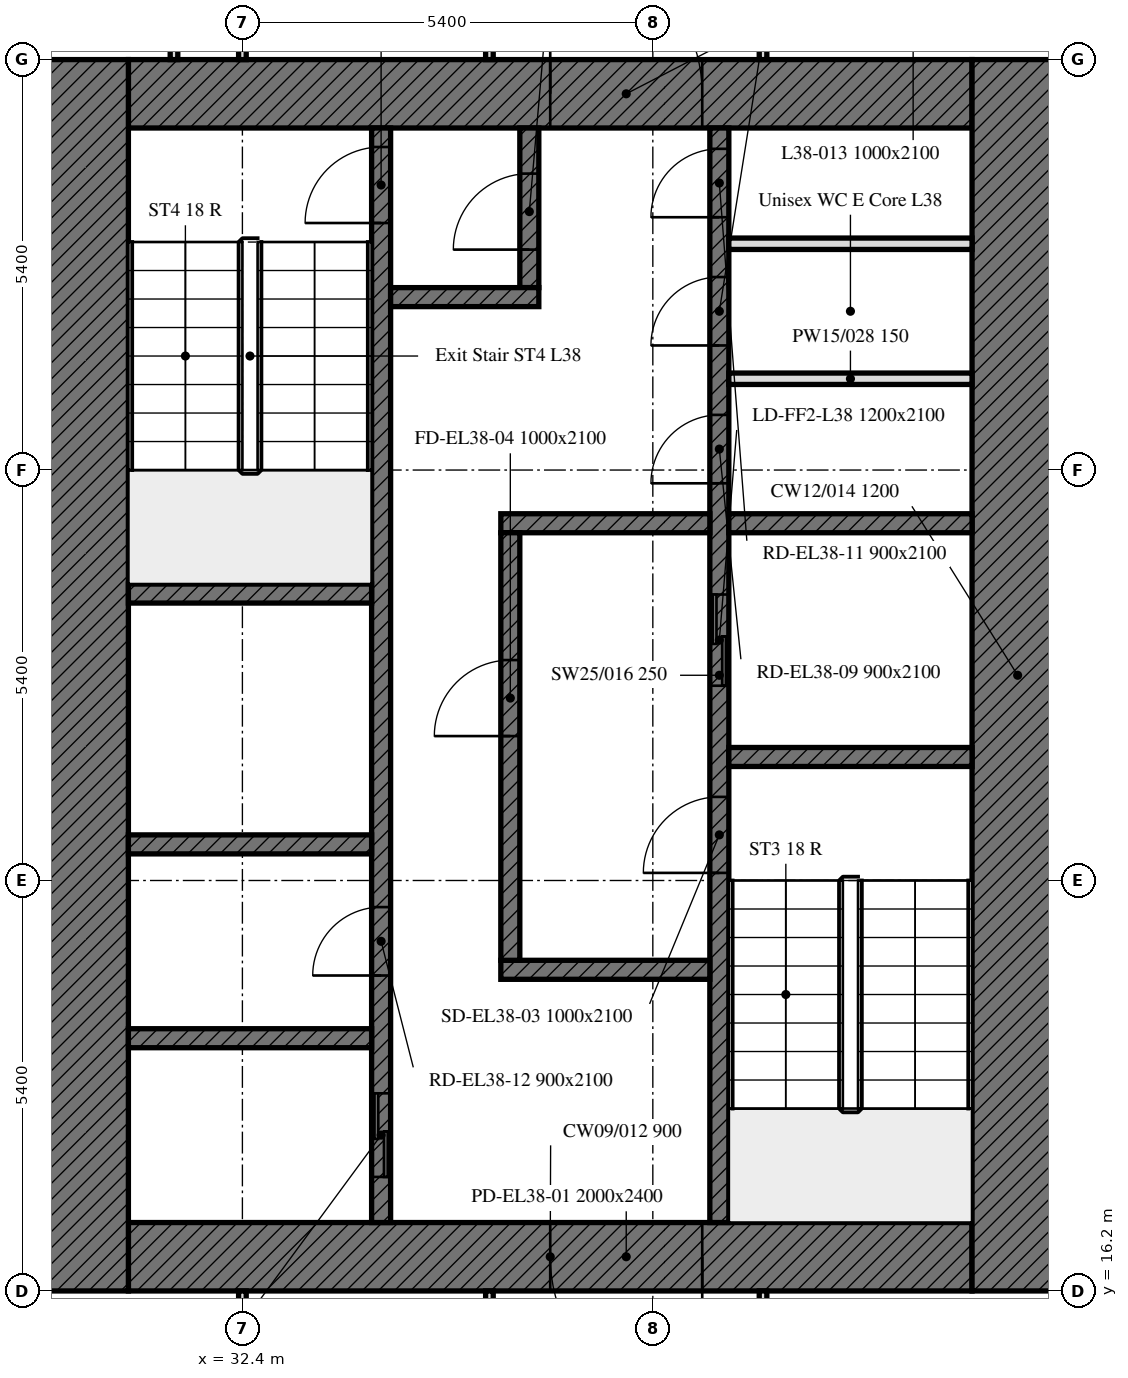
"""IFC4 building model, lengths in metres.
Left out: names, types, materials, properties, quantities, classifications, styles, units other than length and angle.
Written with IfcOpenShell. Run it as: python <this file> out.ifc"""

import sys

from ifc_helpers import new_model, si_unit, direction, frame, frame_2d, origin, place, context, subcontext, project, spatial, rectangle, extrude, element, fill, save


model = new_model("IFC4")
c1 = context("Model", 3, precision=1e-05, world=origin(), true_north=direction((0.0, 1.0)))
c2 = subcontext(c1, "Body", "Model", "MODEL_VIEW")
j1 = project(units=[si_unit("LENGTHUNIT", "METRE"), si_unit("PLANEANGLEUNIT", "RADIAN")], contexts=[c1])
p1 = place(None, origin())
s1 = spatial("IfcSite", under=j1, at=p1, CompositionType="ELEMENT")
p2 = place(p1, origin())
s2 = spatial("IfcBuilding", under=s1, at=p2, CompositionType="ELEMENT")
p3 = place(p2, frame((0.0, 0.0, 162.7)))
s3 = spatial("IfcBuildingStorey", under=s2, at=p3, CompositionType="ELEMENT", Elevation=162.7)
p4 = place(p3, frame((42.0, 16.65, 0.0), z_axis=(0.0, 0.0, 1.0), x_axis=(-1.0, 0.0, 0.0)))
e1 = element("IfcWall", 1, at=p4, inside=s3, PredefinedType="SOLIDWALL", context=c2, shape_type="SweptSolid", body=[
    extrude(rectangle(XDim=11.1, YDim=0.9, at=frame_2d((5.55, 0.0))), origin(), (0.0, 0.0, 1.0), 3.0),
])
p5 = place(p4, frame((3.55, 0.0, 0.0)))
e2 = element("IfcOpeningElement", 2, at=p5, cuts=e1, PredefinedType="OPENING", context=c2, shape_type="SweptSolid", body=[
    extrude(rectangle(XDim=2.0, YDim=2.4, at=frame_2d((1.0, 1.2))), frame((0.0, 0.45, 0.0), z_axis=(0.0, -1.0, 0.0), x_axis=(1.0, 0.0, 0.0)), (0.0, 0.0, 1.0), 0.9),
])
p6 = place(p3, frame((30.9, 31.95, 0.0), z_axis=(0.0, 0.0, 1.0), x_axis=(1.0, 0.0, 0.0)))
e3 = element("IfcWall", 3, at=p6, inside=s3, PredefinedType="SOLIDWALL", context=c2, shape_type="SweptSolid", body=[
    extrude(rectangle(XDim=11.1, YDim=0.9, at=frame_2d((5.55, 0.0))), origin(), (0.0, 0.0, 1.0), 3.0),
])
p7 = place(p6, frame((5.55, 0.0, 0.0)))
e4 = element("IfcOpeningElement", 4, at=p7, cuts=e3, PredefinedType="OPENING", context=c2, shape_type="SweptSolid", body=[
    extrude(rectangle(XDim=2.0, YDim=2.4, at=frame_2d((1.0, 1.2))), frame((0.0, 0.45, 0.0), z_axis=(0.0, -1.0, 0.0), x_axis=(1.0, 0.0, 0.0)), (0.0, 0.0, 1.0), 0.9),
])
for number, where, z_axis, x_axis in (
    (5, (42.6, 32.4, 0.0), (0.0, 0.0, 1.0), (0.0, -1.0, 0.0)),
    (6, (30.3, 16.2, 0.0), (0.0, 0.0, 1.0), (0.0, 1.0, 0.0)),
):
    element("IfcWall", number, at=place(p3, frame(where, z_axis=z_axis, x_axis=x_axis)), inside=s3, PredefinedType="SOLIDWALL", context=c2, shape_type="SweptSolid", body=[
        extrude(rectangle(XDim=16.2, YDim=1.2, at=frame_2d((8.1, 0.0))), origin(), (0.0, 0.0, 1.0), 3.0),
    ])
p8 = place(p3, frame((38.675, 17.1, 0.0), z_axis=(0.0, 0.0, 1.0), x_axis=(0.0, 1.0, 0.0)))
e7 = element("IfcWall", 7, at=p8, inside=s3, PredefinedType="SOLIDWALL", context=c2, shape_type="SweptSolid", body=[
    extrude(rectangle(XDim=14.4, YDim=0.25, at=frame_2d((7.2, 0.0))), origin(), (0.0, 0.0, 1.0), 3.0),
])
p9 = place(p8, frame((4.6, 0.0, 0.0)))
e8 = element("IfcOpeningElement", 8, at=p9, cuts=e7, PredefinedType="OPENING", context=c2, shape_type="SweptSolid", body=[
    extrude(rectangle(XDim=1.0, YDim=2.1, at=frame_2d((0.5, 1.05))), frame((0.0, 0.125, 0.0), z_axis=(0.0, -1.0, 0.0), x_axis=(1.0, 0.0, 0.0)), (0.0, 0.0, 1.0), 0.25),
])
p10 = place(p8, frame((7.062, 0.0, 0.0)))
e9 = element("IfcOpeningElement", 9, at=p10, cuts=e7, PredefinedType="OPENING", context=c2, shape_type="SweptSolid", body=[
    extrude(rectangle(XDim=1.2, YDim=2.1, at=frame_2d((0.6, 1.05))), frame((0.0, 0.125, 0.0), z_axis=(0.0, -1.0, 0.0), x_axis=(1.0, 0.0, 0.0)), (0.0, 0.0, 1.0), 0.25),
])
p11 = place(p8, frame((9.726, 0.0, 0.0)))
e10 = element("IfcOpeningElement", 10, at=p11, cuts=e7, PredefinedType="OPENING", context=c2, shape_type="SweptSolid", body=[
    extrude(rectangle(XDim=0.9, YDim=2.1, at=frame_2d((0.45, 1.05))), frame((0.0, 0.125, 0.0), z_axis=(0.0, -1.0, 0.0), x_axis=(1.0, 0.0, 0.0)), (0.0, 0.0, 1.0), 0.25),
])
p12 = place(p8, frame((11.539, 0.0, 0.0)))
e11 = element("IfcOpeningElement", 11, at=p12, cuts=e7, PredefinedType="OPENING", context=c2, shape_type="SweptSolid", body=[
    extrude(rectangle(XDim=0.9, YDim=2.1, at=frame_2d((0.45, 1.05))), frame((0.0, 0.125, 0.0), z_axis=(0.0, -1.0, 0.0), x_axis=(1.0, 0.0, 0.0)), (0.0, 0.0, 1.0), 0.25),
])
p13 = place(p8, frame((13.226, 0.0, 0.0)))
e12 = element("IfcOpeningElement", 12, at=p13, cuts=e7, PredefinedType="OPENING", context=c2, shape_type="SweptSolid", body=[
    extrude(rectangle(XDim=0.9, YDim=2.1, at=frame_2d((0.45, 1.05))), frame((0.0, 0.125, 0.0), z_axis=(0.0, -1.0, 0.0), x_axis=(1.0, 0.0, 0.0)), (0.0, 0.0, 1.0), 0.25),
])
p14 = place(p3, frame((34.225, 17.1, 0.0), z_axis=(0.0, 0.0, 1.0), x_axis=(0.0, 1.0, 0.0)))
e13 = element("IfcWall", 13, at=p14, inside=s3, PredefinedType="SOLIDWALL", context=c2, shape_type="SweptSolid", body=[
    extrude(rectangle(XDim=14.4, YDim=0.25, at=frame_2d((7.2, 0.0))), origin(), (0.0, 0.0, 1.0), 3.0),
])
p15 = place(p14, frame((13.15, 0.0, 0.0)))
e14 = element("IfcOpeningElement", 14, at=p15, cuts=e13, PredefinedType="OPENING", context=c2, shape_type="SweptSolid", body=[
    extrude(rectangle(XDim=1.0, YDim=2.1, at=frame_2d((0.5, 1.05))), frame((0.0, 0.125, 0.0), z_axis=(0.0, -1.0, 0.0), x_axis=(1.0, 0.0, 0.0)), (0.0, 0.0, 1.0), 0.25),
])
p16 = place(p14, frame((0.6, 0.0, 0.0)))
e15 = element("IfcOpeningElement", 15, at=p16, cuts=e13, PredefinedType="OPENING", context=c2, shape_type="SweptSolid", body=[
    extrude(rectangle(XDim=1.1, YDim=2.1, at=frame_2d((0.55, 1.05))), frame((0.0, 0.125, 0.0), z_axis=(0.0, -1.0, 0.0), x_axis=(1.0, 0.0, 0.0)), (0.0, 0.0, 1.0), 0.25),
])
p17 = place(p14, frame((3.25, 0.0, 0.0)))
e16 = element("IfcOpeningElement", 16, at=p17, cuts=e13, PredefinedType="OPENING", context=c2, shape_type="SweptSolid", body=[
    extrude(rectangle(XDim=0.9, YDim=2.1, at=frame_2d((0.45, 1.05))), frame((0.0, 0.125, 0.0), z_axis=(0.0, -1.0, 0.0), x_axis=(1.0, 0.0, 0.0)), (0.0, 0.0, 1.0), 0.25),
])
p18 = place(p3, frame((38.8, 23.225, 0.0), z_axis=(0.0, 0.0, 1.0), x_axis=(1.0, 0.0, 0.0)))
e17 = element("IfcWall", 17, at=p18, inside=s3, PredefinedType="SOLIDWALL", context=c2, shape_type="SweptSolid", body=[
    extrude(rectangle(XDim=3.2, YDim=0.25, at=frame_2d((1.6, 0.0))), origin(), (0.0, 0.0, 1.0), 3.0),
])
for number, where, z_axis, x_axis in (
    (18, (30.9, 25.375, 0.0), (0.0, 0.0, 1.0), (1.0, 0.0, 0.0)),
    (19, (30.9, 22.075, 0.0), (0.0, 0.0, 1.0), (1.0, 0.0, 0.0)),
):
    element("IfcWall", number, at=place(p3, frame(where, z_axis=z_axis, x_axis=x_axis)), inside=s3, PredefinedType="SOLIDWALL", context=c2, shape_type="SweptSolid", body=[
        extrude(rectangle(XDim=3.2, YDim=0.25, at=frame_2d((1.6, 0.0))), origin(), (0.0, 0.0, 1.0), 3.0),
    ])
p19 = place(p3, frame((38.8, 26.3, 0.0), z_axis=(0.0, 0.0, 1.0), x_axis=(1.0, 0.0, 0.0)))
e20 = element("IfcWall", 20, at=p19, inside=s3, PredefinedType="SOLIDWALL", context=c2, shape_type="SweptSolid", body=[
    extrude(rectangle(XDim=3.2, YDim=0.25, at=frame_2d((1.6, 0.0))), origin(), (0.0, 0.0, 1.0), 3.0),
])
for number, where, z_axis, x_axis in (
    (21, (35.8, 26.3, 0.0), (0.0, 0.0, 1.0), (1.0, 0.0, 0.0)),
    (22, (35.8, 20.425, 0.0), (0.0, 0.0, 1.0), (1.0, 0.0, 0.0)),
):
    element("IfcWall", number, at=place(p3, frame(where, z_axis=z_axis, x_axis=x_axis)), inside=s3, PredefinedType="SOLIDWALL", context=c2, shape_type="SweptSolid", body=[
        extrude(rectangle(XDim=2.75, YDim=0.25, at=frame_2d((1.375, 0.0))), origin(), (0.0, 0.0, 1.0), 3.0),
    ])
p20 = place(p3, frame((36.175, 29.4, 0.0), z_axis=(0.0, 0.0, 1.0), x_axis=(0.0, 1.0, 0.0)))
e23 = element("IfcWall", 23, at=p20, inside=s3, PredefinedType="SOLIDWALL", context=c2, shape_type="SweptSolid", body=[
    extrude(rectangle(XDim=2.1, YDim=0.25, at=frame_2d((1.05, 0.0))), origin(), (0.0, 0.0, 1.0), 3.0),
])
p21 = place(p20, frame((0.5, 0.0, 0.0)))
e24 = element("IfcOpeningElement", 24, at=p21, cuts=e23, PredefinedType="OPENING", context=c2, shape_type="SweptSolid", body=[
    extrude(rectangle(XDim=1.0, YDim=2.1, at=frame_2d((0.5, 1.05))), frame((0.0, 0.125, 0.0), z_axis=(0.0, -1.0, 0.0), x_axis=(1.0, 0.0, 0.0)), (0.0, 0.0, 1.0), 0.25),
])
p22 = place(p3, frame((34.35, 29.275, 0.0), z_axis=(0.0, 0.0, 1.0), x_axis=(1.0, 0.0, 0.0)))
e25 = element("IfcWall", 25, at=p22, inside=s3, PredefinedType="SOLIDWALL", context=c2, shape_type="SweptSolid", body=[
    extrude(rectangle(XDim=1.95, YDim=0.25, at=frame_2d((0.975, 0.0))), origin(), (0.0, 0.0, 1.0), 3.0),
])
p23 = place(p3, frame((35.925, 20.55, 0.0), z_axis=(0.0, 0.0, 1.0), x_axis=(0.0, 1.0, 0.0)))
e26 = element("IfcWall", 26, at=p23, inside=s3, PredefinedType="SOLIDWALL", context=c2, shape_type="SweptSolid", body=[
    extrude(rectangle(XDim=5.625, YDim=0.25, at=frame_2d((2.812, 0.0))), origin(), (0.0, 0.0, 1.0), 3.0),
])
p24 = place(p23, frame((2.95, 0.0, 0.0)))
e27 = element("IfcOpeningElement", 27, at=p24, cuts=e26, PredefinedType="OPENING", context=c2, shape_type="SweptSolid", body=[
    extrude(rectangle(XDim=1.0, YDim=2.1, at=frame_2d((0.5, 1.05))), frame((0.0, 0.125, 0.0), z_axis=(0.0, -1.0, 0.0), x_axis=(1.0, 0.0, 0.0)), (0.0, 0.0, 1.0), 0.25),
])
p25 = place(p3, frame((30.9, 19.525, 0.0), z_axis=(0.0, 0.0, 1.0), x_axis=(1.0, 0.0, 0.0)))
e28 = element("IfcWall", 28, at=p25, inside=s3, PredefinedType="SOLIDWALL", context=c2, shape_type="SweptSolid", body=[
    extrude(rectangle(XDim=3.2, YDim=0.25, at=frame_2d((1.6, 0.0))), origin(), (0.0, 0.0, 1.0), 3.0),
])
for number, where, z_axis, x_axis in (
    (29, (38.8, 28.201, 0.0), (0.0, 0.0, 1.0), (1.0, 0.0, 0.0)),
    (30, (38.8, 29.977, 0.0), (0.0, 0.0, 1.0), (1.0, 0.0, 0.0)),
):
    element("IfcWall", number, at=place(p3, frame(where, z_axis=z_axis, x_axis=x_axis)), inside=s3, PredefinedType="PARTITIONING", context=c2, shape_type="SweptSolid", body=[
        extrude(rectangle(XDim=3.2, YDim=0.15, at=frame_2d((1.6, 0.0))), origin(), (0.0, 0.0, 1.0), 3.0),
    ])
for number, where, z_axis, x_axis in (
    (31, (31.5, 32.4, 0.0), (0.0, 0.0, 1.0), (0.0, 1.0, 0.0)),
    (32, (35.65, 35.025, 0.0), (0.0, 0.0, 1.0), (0.0, -1.0, 0.0)),
    (33, (39.25, 32.4, 0.0), (0.0, 0.0, 1.0), (0.0, 1.0, 0.0)),
    (34, (32.4, 35.025, 0.0), (0.0, 0.0, 1.0), (0.0, -1.0, 0.0)),
):
    element("IfcWall", number, at=place(p3, frame(where, z_axis=z_axis, x_axis=x_axis)), inside=s3, PredefinedType="PARTITIONING", context=c2, shape_type="SweptSolid", body=[
        extrude(rectangle(XDim=2.625, YDim=0.1, at=frame_2d((1.312, 0.0))), origin(), (0.0, 0.0, 1.0), 3.0),
    ])
p26 = place(p3, frame((32.4, 11.245, 0.0), z_axis=(0.0, 0.0, 1.0), x_axis=(0.0, 1.0, 0.0)))
e35 = element("IfcWall", 35, at=p26, inside=s3, PredefinedType="PARTITIONING", context=c2, shape_type="SweptSolid", body=[
    extrude(rectangle(XDim=4.955, YDim=0.1, at=frame_2d((2.478, 0.0))), origin(), (0.0, 0.0, 1.0), 2.4),
])
for number, where, z_axis, x_axis in (
    (36, (35.65, 16.2, 0.0), (0.0, 0.0, 1.0), (0.0, -1.0, 0.0)),
    (37, (39.25, 8.175, 0.0), (0.0, 0.0, 1.0), (0.0, 1.0, 0.0)),
):
    element("IfcWall", number, at=place(p3, frame(where, z_axis=z_axis, x_axis=x_axis)), inside=s3, PredefinedType="PARTITIONING", context=c2, shape_type="SweptSolid", body=[
        extrude(rectangle(XDim=8.025, YDim=0.1, at=frame_2d((4.012, 0.0))), origin(), (0.0, 0.0, 1.0), 2.4),
    ])
p27 = place(p5, origin())
e38 = element("IfcDoor", 38, at=p27, inside=s3, OperationType="DOUBLE_DOOR_SINGLE_SWING", PredefinedType="DOOR", context=c2, shape_type="SweptSolid", body=[
    extrude(rectangle(XDim=2.0, YDim=2.4, at=frame_2d((1.0, 1.2))), frame((0.0, 0.025, 0.0), z_axis=(0.0, -1.0, 0.0), x_axis=(1.0, 0.0, 0.0)), (0.0, 0.0, 1.0), 0.05),
])
fill(e2, e38)
p28 = place(p7, origin())
e39 = element("IfcDoor", 39, at=p28, inside=s3, OperationType="DOUBLE_DOOR_SINGLE_SWING", PredefinedType="DOOR", context=c2, shape_type="SweptSolid", body=[
    extrude(rectangle(XDim=2.0, YDim=2.4, at=frame_2d((1.0, 1.2))), frame((0.0, 0.025, 0.0), z_axis=(0.0, -1.0, 0.0), x_axis=(1.0, 0.0, 0.0)), (0.0, 0.0, 1.0), 0.05),
])
fill(e4, e39)
p29 = place(p9, origin())
e40 = element("IfcDoor", 40, at=p29, inside=s3, OperationType="SINGLE_SWING_LEFT", PredefinedType="DOOR", context=c2, shape_type="SweptSolid", body=[
    extrude(rectangle(XDim=1.0, YDim=2.1, at=frame_2d((0.5, 1.05))), frame((0.0, 0.025, 0.0), z_axis=(0.0, -1.0, 0.0), x_axis=(1.0, 0.0, 0.0)), (0.0, 0.0, 1.0), 0.05),
])
fill(e8, e40)
p30 = place(p24, origin())
e41 = element("IfcDoor", 41, at=p30, inside=s3, OperationType="SINGLE_SWING_LEFT", PredefinedType="DOOR", context=c2, shape_type="SweptSolid", body=[
    extrude(rectangle(XDim=1.0, YDim=2.1, at=frame_2d((0.5, 1.05))), frame((0.0, 0.025, 0.0), z_axis=(0.0, -1.0, 0.0), x_axis=(1.0, 0.0, 0.0)), (0.0, 0.0, 1.0), 0.05),
])
fill(e27, e41)
p31 = place(p15, origin())
e42 = element("IfcDoor", 42, at=p31, inside=s3, OperationType="SINGLE_SWING_LEFT", PredefinedType="DOOR", context=c2, shape_type="SweptSolid", body=[
    extrude(rectangle(XDim=1.0, YDim=2.1, at=frame_2d((0.5, 1.05))), frame((0.0, 0.025, 0.0), z_axis=(0.0, -1.0, 0.0), x_axis=(1.0, 0.0, 0.0)), (0.0, 0.0, 1.0), 0.05),
])
fill(e14, e42)
p32 = place(p21, origin())
e43 = element("IfcDoor", 43, at=p32, inside=s3, OperationType="SINGLE_SWING_LEFT", PredefinedType="DOOR", context=c2, shape_type="SweptSolid", body=[
    extrude(rectangle(XDim=1.0, YDim=2.1, at=frame_2d((0.5, 1.05))), frame((0.0, 0.025, 0.0), z_axis=(0.0, -1.0, 0.0), x_axis=(1.0, 0.0, 0.0)), (0.0, 0.0, 1.0), 0.05),
])
fill(e24, e43)
p33 = place(p10, origin())
e44 = element("IfcDoor", 44, at=p33, inside=s3, OperationType="DOUBLE_DOOR_SLIDING", PredefinedType="DOOR", context=c2, shape_type="SweptSolid", body=[
    extrude(rectangle(XDim=1.2, YDim=2.1, at=frame_2d((0.6, 1.05))), frame((0.0, 0.025, 0.0), z_axis=(0.0, -1.0, 0.0), x_axis=(1.0, 0.0, 0.0)), (0.0, 0.0, 1.0), 0.05),
])
fill(e9, e44)
p34 = place(p16, origin())
e45 = element("IfcDoor", 45, at=p34, inside=s3, OperationType="DOUBLE_DOOR_SLIDING", PredefinedType="DOOR", context=c2, shape_type="SweptSolid", body=[
    extrude(rectangle(XDim=1.1, YDim=2.1, at=frame_2d((0.55, 1.05))), frame((0.0, 0.025, 0.0), z_axis=(0.0, -1.0, 0.0), x_axis=(1.0, 0.0, 0.0)), (0.0, 0.0, 1.0), 0.05),
])
fill(e15, e45)
p35 = place(p11, origin())
e46 = element("IfcDoor", 46, at=p35, inside=s3, OperationType="SINGLE_SWING_LEFT", PredefinedType="DOOR", context=c2, shape_type="SweptSolid", body=[
    extrude(rectangle(XDim=0.9, YDim=2.1, at=frame_2d((0.45, 1.05))), frame((0.0, 0.025, 0.0), z_axis=(0.0, -1.0, 0.0), x_axis=(1.0, 0.0, 0.0)), (0.0, 0.0, 1.0), 0.05),
])
fill(e10, e46)
p36 = place(p12, origin())
e47 = element("IfcDoor", 47, at=p36, inside=s3, OperationType="SINGLE_SWING_LEFT", PredefinedType="DOOR", context=c2, shape_type="SweptSolid", body=[
    extrude(rectangle(XDim=0.9, YDim=2.1, at=frame_2d((0.45, 1.05))), frame((0.0, 0.025, 0.0), z_axis=(0.0, -1.0, 0.0), x_axis=(1.0, 0.0, 0.0)), (0.0, 0.0, 1.0), 0.05),
])
fill(e11, e47)
p37 = place(p13, origin())
e48 = element("IfcDoor", 48, at=p37, inside=s3, OperationType="SINGLE_SWING_LEFT", PredefinedType="DOOR", context=c2, shape_type="SweptSolid", body=[
    extrude(rectangle(XDim=0.9, YDim=2.1, at=frame_2d((0.45, 1.05))), frame((0.0, 0.025, 0.0), z_axis=(0.0, -1.0, 0.0), x_axis=(1.0, 0.0, 0.0)), (0.0, 0.0, 1.0), 0.05),
])
fill(e12, e48)
p38 = place(p17, origin())
e49 = element("IfcDoor", 49, at=p38, inside=s3, OperationType="SINGLE_SWING_LEFT", PredefinedType="DOOR", context=c2, shape_type="SweptSolid", body=[
    extrude(rectangle(XDim=0.9, YDim=2.1, at=frame_2d((0.45, 1.05))), frame((0.0, 0.025, 0.0), z_axis=(0.0, -1.0, 0.0), x_axis=(1.0, 0.0, 0.0)), (0.0, 0.0, 1.0), 0.05),
])
fill(e16, e49)
save(model, sys.argv[1])
